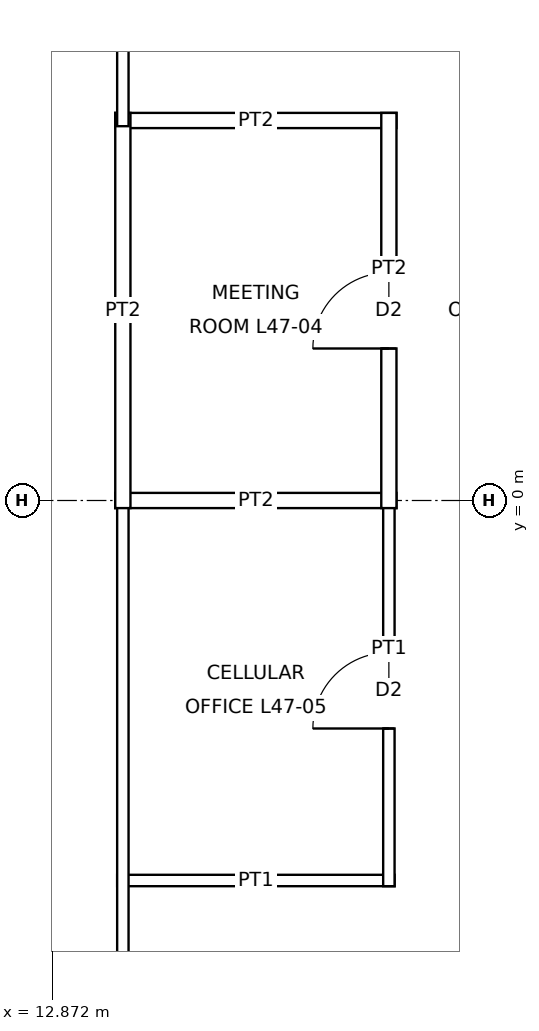
"""IFC4 building model, lengths in metres.
Left out: names, types, materials, properties, quantities, classifications, styles, units other than length and angle.
Written with IfcOpenShell. Run it as: python <this file> out.ifc"""

import sys

from ifc_helpers import new_model, si_unit, direction, frame, frame_2d, origin, place, context, subcontext, project, spatial, rectangle, extrude, element, fill, save


model = new_model("IFC4")
c1 = context("Model", 3, precision=1e-05, world=origin(), true_north=direction((0.0, 1.0)))
c2 = subcontext(c1, "Body", "Model", "MODEL_VIEW")
j1 = project(units=[si_unit("LENGTHUNIT", "METRE"), si_unit("PLANEANGLEUNIT", "RADIAN")], contexts=[c1])
p1 = place(None, origin())
s1 = spatial("IfcSite", under=j1, at=p1, CompositionType="ELEMENT")
p2 = place(p1, origin())
s2 = spatial("IfcBuilding", under=s1, at=p2, CompositionType="ELEMENT")
p3 = place(p2, frame((0.0, 0.0, 221.9)))
s3 = spatial("IfcBuildingStorey", under=s2, at=p3, CompositionType="ELEMENT", Elevation=221.9)
p4 = place(p3, frame((13.725, -5.0, 0.0), z_axis=(0.0, 0.0, 1.0), x_axis=(1.0, 0.0, 0.0)))
e1 = element("IfcWall", 1, at=p4, inside=s3, PredefinedType="PARTITIONING", context=c2, shape_type="SweptSolid", body=[
    extrude(rectangle(XDim=3.65, YDim=0.15, at=frame_2d((1.825, 0.0))), origin(), (0.0, 0.0, 1.0), 3.85),
])
p5 = place(p3, frame((13.7, 0.0, 0.0), z_axis=(0.0, 0.0, 1.0), x_axis=(1.0, 0.0, 0.0)))
e2 = element("IfcWall", 2, at=p5, inside=s3, PredefinedType="PARTITIONING", context=c2, shape_type="SweptSolid", body=[
    extrude(rectangle(XDim=3.7, YDim=0.2, at=frame_2d((1.85, 0.0))), origin(), (0.0, 0.0, 1.0), 3.238),
])
p6 = place(p3, frame((13.7, 5.0, 0.0), z_axis=(0.0, 0.0, 1.0), x_axis=(1.0, 0.0, 0.0)))
e3 = element("IfcWall", 3, at=p6, inside=s3, PredefinedType="PARTITIONING", context=c2, shape_type="SweptSolid", body=[
    extrude(rectangle(XDim=3.7, YDim=0.2, at=frame_2d((1.85, 0.0))), origin(), (0.0, 0.0, 1.0), 3.85),
])
p7 = place(p3, frame((13.8, -13.875, 0.0), z_axis=(0.0, 0.0, 1.0), x_axis=(0.0, 1.0, 0.0)))
e4 = element("IfcWall", 4, at=p7, inside=s3, PredefinedType="PARTITIONING", context=c2, shape_type="SweptSolid", body=[
    extrude(rectangle(XDim=13.95, YDim=0.15, at=frame_2d((6.975, 0.0))), origin(), (0.0, 0.0, 1.0), 3.85),
])
p8 = place(p3, frame((13.8, -0.1, 0.0), z_axis=(0.0, 0.0, 1.0), x_axis=(0.0, 1.0, 0.0)))
e5 = element("IfcWall", 5, at=p8, inside=s3, PredefinedType="PARTITIONING", context=c2, shape_type="SweptSolid", body=[
    extrude(rectangle(XDim=5.2, YDim=0.2, at=frame_2d((2.6, 0.0))), origin(), (0.0, 0.0, 1.0), 3.85),
])
p9 = place(p3, frame((13.8, 4.925, 0.0), z_axis=(0.0, 0.0, 1.0), x_axis=(0.0, 1.0, 0.0)))
e6 = element("IfcWall", 6, at=p9, inside=s3, PredefinedType="PARTITIONING", context=c2, shape_type="SweptSolid", body=[
    extrude(rectangle(XDim=7.15, YDim=0.15, at=frame_2d((3.575, 0.0))), origin(), (0.0, 0.0, 1.0), 3.85),
])
p10 = place(p3, frame((17.3, -5.075, 0.0), z_axis=(0.0, 0.0, 1.0), x_axis=(0.0, 1.0, 0.0)))
e7 = element("IfcWall", 7, at=p10, inside=s3, PredefinedType="PARTITIONING", context=c2, shape_type="SweptSolid", body=[
    extrude(rectangle(XDim=5.15, YDim=0.15, at=frame_2d((2.575, 0.0))), origin(), (0.0, 0.0, 1.0), 3.85),
])
p11 = place(p10, frame((2.075, 0.0, 0.0)))
e8 = element("IfcOpeningElement", 8, at=p11, cuts=e7, PredefinedType="OPENING", context=c2, shape_type="SweptSolid", body=[
    extrude(rectangle(XDim=1.0, YDim=2.1, at=frame_2d((0.5, 1.05))), frame((0.0, 0.085, 0.0), z_axis=(0.0, -1.0, 0.0), x_axis=(1.0, 0.0, 0.0)), (0.0, 0.0, 1.0), 0.17),
])
p12 = place(p3, frame((17.3, -0.1, 0.0), z_axis=(0.0, 0.0, 1.0), x_axis=(0.0, 1.0, 0.0)))
e9 = element("IfcWall", 9, at=p12, inside=s3, PredefinedType="PARTITIONING", context=c2, shape_type="SweptSolid", body=[
    extrude(rectangle(XDim=5.2, YDim=0.2, at=frame_2d((2.6, 0.0))), origin(), (0.0, 0.0, 1.0), 3.85),
])
p13 = place(p12, frame((2.1, 0.0, 0.0)))
e10 = element("IfcOpeningElement", 10, at=p13, cuts=e9, PredefinedType="OPENING", context=c2, shape_type="SweptSolid", body=[
    extrude(rectangle(XDim=1.0, YDim=2.1, at=frame_2d((0.5, 1.05))), frame((0.0, 0.11, 0.0), z_axis=(0.0, -1.0, 0.0), x_axis=(1.0, 0.0, 0.0)), (0.0, 0.0, 1.0), 0.22),
])
p14 = place(p13, origin())
e11 = element("IfcDoor", 11, at=p14, inside=s3, OperationType="SINGLE_SWING_LEFT", PredefinedType="DOOR", context=c2, shape_type="SweptSolid", body=[
    extrude(rectangle(XDim=1.0, YDim=2.1, at=frame_2d((0.5, 1.05))), frame((0.0, 0.025, 0.0), z_axis=(0.0, -1.0, 0.0), x_axis=(1.0, 0.0, 0.0)), (0.0, 0.0, 1.0), 0.05),
])
fill(e10, e11)
p15 = place(p11, origin())
e12 = element("IfcDoor", 12, at=p15, inside=s3, OperationType="SINGLE_SWING_LEFT", PredefinedType="DOOR", context=c2, shape_type="SweptSolid", body=[
    extrude(rectangle(XDim=1.0, YDim=2.1, at=frame_2d((0.5, 1.05))), frame((0.0, 0.025, 0.0), z_axis=(0.0, -1.0, 0.0), x_axis=(1.0, 0.0, 0.0)), (0.0, 0.0, 1.0), 0.05),
])
fill(e8, e12)
save(model, sys.argv[1])
